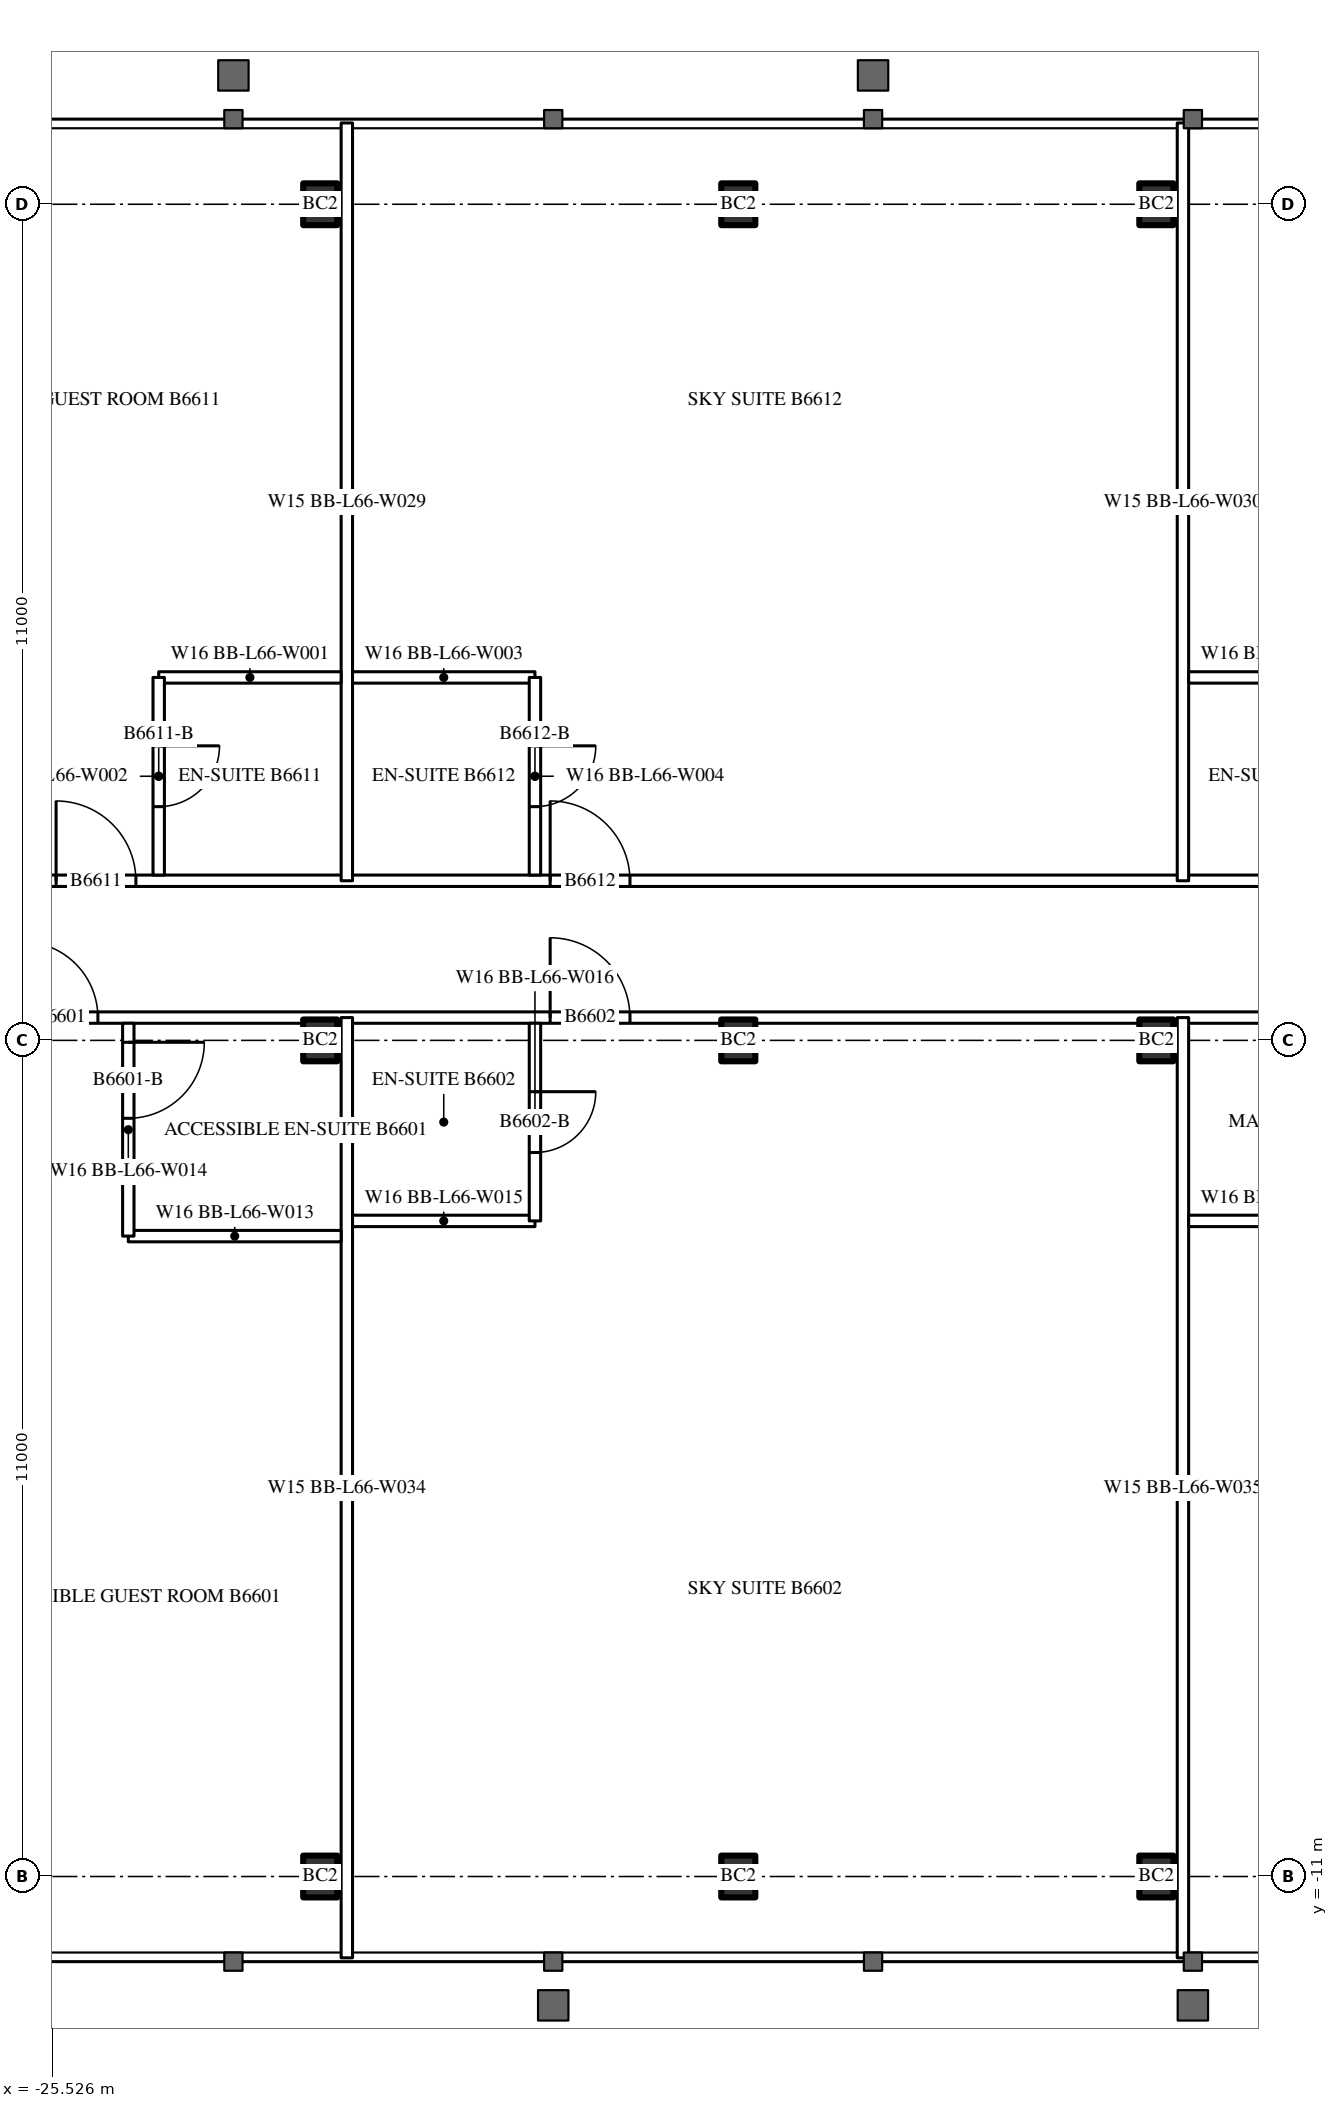
"""IFC4 building model, lengths in metres.
Left out: names, types, materials, properties, quantities, classifications, styles, units other than length and angle.
Written with IfcOpenShell. Run it as: python <this file> out.ifc"""

import sys

from ifc_helpers import new_model, si_unit, direction, frame, frame_2d, origin, origin_2d, place, context, subcontext, project, spatial, rectangle, i_section, extrude, element, fill, save


model = new_model("IFC4")
c1 = context("Model", 3, precision=1e-05, world=origin(), true_north=direction((0.0, 1.0)))
c2 = subcontext(c1, "Body", "Model", "MODEL_VIEW")
j1 = project(units=[si_unit("LENGTHUNIT", "METRE"), si_unit("PLANEANGLEUNIT", "RADIAN")], contexts=[c1])
p1 = place(None, origin())
s1 = spatial("IfcSite", under=j1, at=p1, CompositionType="ELEMENT")
p2 = place(p1, origin())
s2 = spatial("IfcBuilding", under=s1, at=p2, CompositionType="ELEMENT")
p3 = place(p2, frame((0.0, 0.0, 247.7)))
s3 = spatial("IfcBuildingStorey", under=s2, at=p3, CompositionType="ELEMENT", Elevation=247.7)
for number, where, z_axis, x_axis in (
    (1, (-22.0, -11.0, 0.0), (0.0, 0.0, 1.0), (1.0, 0.0, 0.0)),
    (2, (-16.5, -11.0, 0.0), (0.0, 0.0, 1.0), (1.0, 0.0, 0.0)),
    (3, (-11.0, -11.0, 0.0), (0.0, 0.0, 1.0), (1.0, 0.0, 0.0)),
    (4, (-22.0, 0.0, 0.0), (0.0, 0.0, 1.0), (1.0, 0.0, 0.0)),
    (5, (-16.5, 0.0, 0.0), (0.0, 0.0, 1.0), (1.0, 0.0, 0.0)),
    (6, (-11.0, 0.0, 0.0), (0.0, 0.0, 1.0), (1.0, 0.0, 0.0)),
    (7, (-22.0, 11.0, 0.0), (0.0, 0.0, 1.0), (1.0, 0.0, 0.0)),
    (8, (-16.5, 11.0, 0.0), (0.0, 0.0, 1.0), (1.0, 0.0, 0.0)),
    (9, (-11.0, 11.0, 0.0), (0.0, 0.0, 1.0), (1.0, 0.0, 0.0)),
):
    element("IfcColumn", number, at=place(p3, frame(where, z_axis=z_axis, x_axis=x_axis)), inside=s3, PredefinedType="COLUMN", context=c2, shape_type="SweptSolid", body=[
        extrude(i_section(OverallWidth=0.448, OverallDepth=0.55, WebThickness=0.072, FlangeThickness=0.115, FilletRadius=0.02, at=origin_2d()), origin(), (0.0, 0.0, 1.0), 4.2),
    ])
p4 = place(p3, frame((-27.5, 0.3, 0.0), z_axis=(0.0, 0.0, 1.0), x_axis=(1.0, 0.0, 0.0)))
e10 = element("IfcWall", 10, at=p4, inside=s3, PredefinedType="PARTITIONING", context=c2, shape_type="SweptSolid", body=[
    extrude(rectangle(XDim=55.0, YDim=0.15, at=frame_2d((27.5, 0.0))), origin(), (0.0, 0.0, 1.0), 3.0),
])
p5 = place(p4, frame((1.575, 0.0, 0.0)))
e11 = element("IfcOpeningElement", 11, at=p5, cuts=e10, PredefinedType="OPENING", context=c2, shape_type="SweptSolid", body=[
    extrude(rectangle(XDim=1.0, YDim=2.2, at=frame_2d((0.5, 1.1))), frame((0.0, 0.085, 0.0), z_axis=(0.0, -1.0, 0.0), x_axis=(1.0, 0.0, 0.0)), (0.0, 0.0, 1.0), 0.17),
])
p6 = place(p4, frame((8.525, 0.0, 0.0)))
e12 = element("IfcOpeningElement", 12, at=p6, cuts=e10, PredefinedType="OPENING", context=c2, shape_type="SweptSolid", body=[
    extrude(rectangle(XDim=1.05, YDim=2.4, at=frame_2d((0.525, 1.2))), frame((0.0, 0.085, 0.0), z_axis=(0.0, -1.0, 0.0), x_axis=(1.0, 0.0, 0.0)), (0.0, 0.0, 1.0), 0.17),
])
p7 = place(p4, frame((19.525, 0.0, 0.0)))
e13 = element("IfcOpeningElement", 13, at=p7, cuts=e10, PredefinedType="OPENING", context=c2, shape_type="SweptSolid", body=[
    extrude(rectangle(XDim=1.05, YDim=2.4, at=frame_2d((0.525, 1.2))), frame((0.0, 0.085, 0.0), z_axis=(0.0, -1.0, 0.0), x_axis=(1.0, 0.0, 0.0)), (0.0, 0.0, 1.0), 0.17),
])
p8 = place(p4, frame((25.025, 0.0, 0.0)))
e14 = element("IfcOpeningElement", 14, at=p8, cuts=e10, PredefinedType="OPENING", context=c2, shape_type="SweptSolid", body=[
    extrude(rectangle(XDim=1.05, YDim=2.4, at=frame_2d((0.525, 1.2))), frame((0.0, 0.085, 0.0), z_axis=(0.0, -1.0, 0.0), x_axis=(1.0, 0.0, 0.0)), (0.0, 0.0, 1.0), 0.17),
])
p9 = place(p4, frame((30.525, 0.0, 0.0)))
e15 = element("IfcOpeningElement", 15, at=p9, cuts=e10, PredefinedType="OPENING", context=c2, shape_type="SweptSolid", body=[
    extrude(rectangle(XDim=1.05, YDim=2.4, at=frame_2d((0.525, 1.2))), frame((0.0, 0.085, 0.0), z_axis=(0.0, -1.0, 0.0), x_axis=(1.0, 0.0, 0.0)), (0.0, 0.0, 1.0), 0.17),
])
p10 = place(p4, frame((41.525, 0.0, 0.0)))
e16 = element("IfcOpeningElement", 16, at=p10, cuts=e10, PredefinedType="OPENING", context=c2, shape_type="SweptSolid", body=[
    extrude(rectangle(XDim=1.05, YDim=2.4, at=frame_2d((0.525, 1.2))), frame((0.0, 0.085, 0.0), z_axis=(0.0, -1.0, 0.0), x_axis=(1.0, 0.0, 0.0)), (0.0, 0.0, 1.0), 0.17),
])
p11 = place(p4, frame((52.525, 0.0, 0.0)))
e17 = element("IfcOpeningElement", 17, at=p11, cuts=e10, PredefinedType="OPENING", context=c2, shape_type="SweptSolid", body=[
    extrude(rectangle(XDim=1.05, YDim=2.4, at=frame_2d((0.525, 1.2))), frame((0.0, 0.085, 0.0), z_axis=(0.0, -1.0, 0.0), x_axis=(1.0, 0.0, 0.0)), (0.0, 0.0, 1.0), 0.17),
])
p12 = place(p3, frame((-27.5, 2.1, 0.0), z_axis=(0.0, 0.0, 1.0), x_axis=(1.0, 0.0, 0.0)))
e18 = element("IfcWall", 18, at=p12, inside=s3, PredefinedType="PARTITIONING", context=c2, shape_type="SweptSolid", body=[
    extrude(rectangle(XDim=55.0, YDim=0.15, at=frame_2d((27.5, 0.0))), origin(), (0.0, 0.0, 1.0), 4.0),
])
p13 = place(p12, frame((2.025, 0.0, 0.0)))
e19 = element("IfcOpeningElement", 19, at=p13, cuts=e18, PredefinedType="OPENING", context=c2, shape_type="SweptSolid", body=[
    extrude(rectangle(XDim=1.05, YDim=2.4, at=frame_2d((0.525, 1.2))), frame((0.0, 0.085, 0.0), z_axis=(0.0, -1.0, 0.0), x_axis=(1.0, 0.0, 0.0)), (0.0, 0.0, 1.0), 0.17),
])
p14 = place(p12, frame((8.525, 0.0, 0.0)))
e20 = element("IfcOpeningElement", 20, at=p14, cuts=e18, PredefinedType="OPENING", context=c2, shape_type="SweptSolid", body=[
    extrude(rectangle(XDim=1.05, YDim=2.4, at=frame_2d((0.525, 1.2))), frame((0.0, 0.085, 0.0), z_axis=(0.0, -1.0, 0.0), x_axis=(1.0, 0.0, 0.0)), (0.0, 0.0, 1.0), 0.17),
])
p15 = place(p12, frame((19.525, 0.0, 0.0)))
e21 = element("IfcOpeningElement", 21, at=p15, cuts=e18, PredefinedType="OPENING", context=c2, shape_type="SweptSolid", body=[
    extrude(rectangle(XDim=1.05, YDim=2.4, at=frame_2d((0.525, 1.2))), frame((0.0, 0.085, 0.0), z_axis=(0.0, -1.0, 0.0), x_axis=(1.0, 0.0, 0.0)), (0.0, 0.0, 1.0), 0.17),
])
p16 = place(p12, frame((30.525, 0.0, 0.0)))
e22 = element("IfcOpeningElement", 22, at=p16, cuts=e18, PredefinedType="OPENING", context=c2, shape_type="SweptSolid", body=[
    extrude(rectangle(XDim=1.05, YDim=2.4, at=frame_2d((0.525, 1.2))), frame((0.0, 0.085, 0.0), z_axis=(0.0, -1.0, 0.0), x_axis=(1.0, 0.0, 0.0)), (0.0, 0.0, 1.0), 0.17),
])
p17 = place(p12, frame((41.525, 0.0, 0.0)))
e23 = element("IfcOpeningElement", 23, at=p17, cuts=e18, PredefinedType="OPENING", context=c2, shape_type="SweptSolid", body=[
    extrude(rectangle(XDim=1.05, YDim=2.4, at=frame_2d((0.525, 1.2))), frame((0.0, 0.085, 0.0), z_axis=(0.0, -1.0, 0.0), x_axis=(1.0, 0.0, 0.0)), (0.0, 0.0, 1.0), 0.17),
])
p18 = place(p12, frame((52.525, 0.0, 0.0)))
e24 = element("IfcOpeningElement", 24, at=p18, cuts=e18, PredefinedType="OPENING", context=c2, shape_type="SweptSolid", body=[
    extrude(rectangle(XDim=1.05, YDim=2.4, at=frame_2d((0.525, 1.2))), frame((0.0, 0.085, 0.0), z_axis=(0.0, -1.0, 0.0), x_axis=(1.0, 0.0, 0.0)), (0.0, 0.0, 1.0), 0.17),
])
for number, where, z_axis, x_axis in (
    (25, (-21.65, -12.07, 0.0), (0.0, 0.0, 1.0), (0.0, 1.0, 0.0)),
    (26, (-10.65, -12.07, 0.0), (0.0, 0.0, 1.0), (0.0, 1.0, 0.0)),
):
    element("IfcWall", number, at=place(p3, frame(where, z_axis=z_axis, x_axis=x_axis)), inside=s3, PredefinedType="PARTITIONING", context=c2, shape_type="SweptSolid", body=[
        extrude(rectangle(XDim=12.37, YDim=0.15, at=frame_2d((6.185, 0.0))), origin(), (0.0, 0.0, 1.0), 4.0),
    ])
p19 = place(p3, frame((-24.525, -2.575, 0.0), z_axis=(0.0, 0.0, 1.0), x_axis=(1.0, 0.0, 0.0)))
e27 = element("IfcWall", 27, at=p19, inside=s3, PredefinedType="PARTITIONING", context=c2, shape_type="SweptSolid", body=[
    extrude(rectangle(XDim=2.8, YDim=0.15, at=frame_2d((1.4, 0.0))), origin(), (0.0, 0.0, 1.0), 4.0),
])
p20 = place(p3, frame((-24.525, -2.575, 0.0), z_axis=(0.0, 0.0, 1.0), x_axis=(0.0, 1.0, 0.0)))
e28 = element("IfcWall", 28, at=p20, inside=s3, PredefinedType="PARTITIONING", context=c2, shape_type="SweptSolid", body=[
    extrude(rectangle(XDim=2.8, YDim=0.15, at=frame_2d((1.4, 0.0))), origin(), (0.0, 0.0, 1.0), 4.0),
])
p21 = place(p20, frame((1.55, 0.0, 0.0)))
e29 = element("IfcOpeningElement", 29, at=p21, cuts=e28, PredefinedType="OPENING", context=c2, shape_type="SweptSolid", body=[
    extrude(rectangle(XDim=1.0, YDim=2.2, at=frame_2d((0.5, 1.1))), frame((0.0, 0.085, 0.0), z_axis=(0.0, -1.0, 0.0), x_axis=(1.0, 0.0, 0.0)), (0.0, 0.0, 1.0), 0.17),
])
p22 = place(p3, frame((-21.575, -2.375, 0.0), z_axis=(0.0, 0.0, 1.0), x_axis=(1.0, 0.0, 0.0)))
e30 = element("IfcWall", 30, at=p22, inside=s3, PredefinedType="PARTITIONING", context=c2, shape_type="SweptSolid", body=[
    extrude(rectangle(XDim=2.4, YDim=0.15, at=frame_2d((1.2, 0.0))), origin(), (0.0, 0.0, 1.0), 4.0),
])
p23 = place(p3, frame((-19.175, -2.375, 0.0), z_axis=(0.0, 0.0, 1.0), x_axis=(0.0, 1.0, 0.0)))
e31 = element("IfcWall", 31, at=p23, inside=s3, PredefinedType="PARTITIONING", context=c2, shape_type="SweptSolid", body=[
    extrude(rectangle(XDim=2.6, YDim=0.15, at=frame_2d((1.3, 0.0))), origin(), (0.0, 0.0, 1.0), 4.0),
])
p24 = place(p23, frame((0.9, 0.0, 0.0)))
e32 = element("IfcOpeningElement", 32, at=p24, cuts=e31, PredefinedType="OPENING", context=c2, shape_type="SweptSolid", body=[
    extrude(rectangle(XDim=0.8, YDim=2.2, at=frame_2d((0.4, 1.1))), frame((0.0, 0.085, 0.0), z_axis=(0.0, -1.0, 0.0), x_axis=(1.0, 0.0, 0.0)), (0.0, 0.0, 1.0), 0.17),
])
p25 = place(p3, frame((-10.575, -2.375, 0.0), z_axis=(0.0, 0.0, 1.0), x_axis=(1.0, 0.0, 0.0)))
e33 = element("IfcWall", 33, at=p25, inside=s3, PredefinedType="PARTITIONING", context=c2, shape_type="SweptSolid", body=[
    extrude(rectangle(XDim=2.4, YDim=0.15, at=frame_2d((1.2, 0.0))), origin(), (0.0, 0.0, 1.0), 4.0),
])
for number, where, z_axis, x_axis in (
    (34, (-21.65, 2.1, 0.0), (0.0, 0.0, 1.0), (0.0, 1.0, 0.0)),
    (35, (-10.65, 2.1, 0.0), (0.0, 0.0, 1.0), (0.0, 1.0, 0.0)),
):
    element("IfcWall", number, at=place(p3, frame(where, z_axis=z_axis, x_axis=x_axis)), inside=s3, PredefinedType="PARTITIONING", context=c2, shape_type="SweptSolid", body=[
        extrude(rectangle(XDim=9.97, YDim=0.15, at=frame_2d((4.985, 0.0))), origin(), (0.0, 0.0, 1.0), 4.0),
    ])
p26 = place(p3, frame((-24.125, 4.775, 0.0), z_axis=(0.0, 0.0, 1.0), x_axis=(1.0, 0.0, 0.0)))
e36 = element("IfcWall", 36, at=p26, inside=s3, PredefinedType="PARTITIONING", context=c2, shape_type="SweptSolid", body=[
    extrude(rectangle(XDim=2.4, YDim=0.15, at=frame_2d((1.2, 0.0))), origin(), (0.0, 0.0, 1.0), 4.0),
])
p27 = place(p3, frame((-24.125, 2.175, 0.0), z_axis=(0.0, 0.0, 1.0), x_axis=(0.0, 1.0, 0.0)))
e37 = element("IfcWall", 37, at=p27, inside=s3, PredefinedType="PARTITIONING", context=c2, shape_type="SweptSolid", body=[
    extrude(rectangle(XDim=2.6, YDim=0.15, at=frame_2d((1.3, 0.0))), origin(), (0.0, 0.0, 1.0), 4.0),
])
p28 = place(p27, frame((0.9, 0.0, 0.0)))
e38 = element("IfcOpeningElement", 38, at=p28, cuts=e37, PredefinedType="OPENING", context=c2, shape_type="SweptSolid", body=[
    extrude(rectangle(XDim=0.8, YDim=2.2, at=frame_2d((0.4, 1.1))), frame((0.0, 0.085, 0.0), z_axis=(0.0, -1.0, 0.0), x_axis=(1.0, 0.0, 0.0)), (0.0, 0.0, 1.0), 0.17),
])
p29 = place(p3, frame((-21.575, 4.775, 0.0), z_axis=(0.0, 0.0, 1.0), x_axis=(1.0, 0.0, 0.0)))
e39 = element("IfcWall", 39, at=p29, inside=s3, PredefinedType="PARTITIONING", context=c2, shape_type="SweptSolid", body=[
    extrude(rectangle(XDim=2.4, YDim=0.15, at=frame_2d((1.2, 0.0))), origin(), (0.0, 0.0, 1.0), 4.0),
])
p30 = place(p3, frame((-19.175, 2.175, 0.0), z_axis=(0.0, 0.0, 1.0), x_axis=(0.0, 1.0, 0.0)))
e40 = element("IfcWall", 40, at=p30, inside=s3, PredefinedType="PARTITIONING", context=c2, shape_type="SweptSolid", body=[
    extrude(rectangle(XDim=2.6, YDim=0.15, at=frame_2d((1.3, 0.0))), origin(), (0.0, 0.0, 1.0), 4.0),
])
p31 = place(p30, frame((0.9, 0.0, 0.0)))
e41 = element("IfcOpeningElement", 41, at=p31, cuts=e40, PredefinedType="OPENING", context=c2, shape_type="SweptSolid", body=[
    extrude(rectangle(XDim=0.8, YDim=2.2, at=frame_2d((0.4, 1.1))), frame((0.0, 0.085, 0.0), z_axis=(0.0, -1.0, 0.0), x_axis=(1.0, 0.0, 0.0)), (0.0, 0.0, 1.0), 0.17),
])
p32 = place(p3, frame((-10.575, 4.775, 0.0), z_axis=(0.0, 0.0, 1.0), x_axis=(1.0, 0.0, 0.0)))
e42 = element("IfcWall", 42, at=p32, inside=s3, PredefinedType="PARTITIONING", context=c2, shape_type="SweptSolid", body=[
    extrude(rectangle(XDim=2.4, YDim=0.15, at=frame_2d((1.2, 0.0))), origin(), (0.0, 0.0, 1.0), 4.0),
])
p33 = place(p21, origin())
e43 = element("IfcDoor", 43, at=p33, inside=s3, OperationType="SINGLE_SWING_RIGHT", PredefinedType="DOOR", context=c2, shape_type="SweptSolid", body=[
    extrude(rectangle(XDim=1.0, YDim=2.2, at=frame_2d((0.5, 1.1))), frame((0.0, 0.025, 0.0), z_axis=(0.0, -1.0, 0.0), x_axis=(1.0, 0.0, 0.0)), (0.0, 0.0, 1.0), 0.05),
])
fill(e29, e43)
p34 = place(p5, origin())
e44 = element("IfcDoor", 44, at=p34, inside=s3, OperationType="SINGLE_SWING_LEFT", PredefinedType="DOOR", context=c2, shape_type="SweptSolid", body=[
    extrude(rectangle(XDim=1.0, YDim=2.2, at=frame_2d((0.5, 1.1))), frame((0.0, 0.025, 0.0), z_axis=(0.0, -1.0, 0.0), x_axis=(1.0, 0.0, 0.0)), (0.0, 0.0, 1.0), 0.05),
])
fill(e11, e44)
p35 = place(p24, origin())
e45 = element("IfcDoor", 45, at=p35, inside=s3, OperationType="SINGLE_SWING_RIGHT", PredefinedType="DOOR", context=c2, shape_type="SweptSolid", body=[
    extrude(rectangle(XDim=0.8, YDim=2.2, at=frame_2d((0.4, 1.1))), frame((0.0, 0.025, 0.0), z_axis=(0.0, -1.0, 0.0), x_axis=(1.0, 0.0, 0.0)), (0.0, 0.0, 1.0), 0.05),
])
fill(e32, e45)
p36 = place(p6, origin())
e46 = element("IfcDoor", 46, at=p36, inside=s3, OperationType="SINGLE_SWING_LEFT", PredefinedType="DOOR", context=c2, shape_type="SweptSolid", body=[
    extrude(rectangle(XDim=1.05, YDim=2.4, at=frame_2d((0.525, 1.2))), frame((0.0, 0.025, 0.0), z_axis=(0.0, -1.0, 0.0), x_axis=(1.0, 0.0, 0.0)), (0.0, 0.0, 1.0), 0.05),
])
fill(e12, e46)
p37 = place(p28, origin())
e47 = element("IfcDoor", 47, at=p37, inside=s3, OperationType="SINGLE_SWING_RIGHT", PredefinedType="DOOR", context=c2, shape_type="SweptSolid", body=[
    extrude(rectangle(XDim=0.8, YDim=2.2, at=frame_2d((0.4, 1.1))), frame((0.0, 0.025, 0.0), z_axis=(0.0, -1.0, 0.0), x_axis=(1.0, 0.0, 0.0)), (0.0, 0.0, 1.0), 0.05),
])
fill(e38, e47)
p38 = place(p13, origin())
e48 = element("IfcDoor", 48, at=p38, inside=s3, OperationType="SINGLE_SWING_LEFT", PredefinedType="DOOR", context=c2, shape_type="SweptSolid", body=[
    extrude(rectangle(XDim=1.05, YDim=2.4, at=frame_2d((0.525, 1.2))), frame((0.0, 0.025, 0.0), z_axis=(0.0, -1.0, 0.0), x_axis=(1.0, 0.0, 0.0)), (0.0, 0.0, 1.0), 0.05),
])
fill(e19, e48)
p39 = place(p31, origin())
e49 = element("IfcDoor", 49, at=p39, inside=s3, OperationType="SINGLE_SWING_RIGHT", PredefinedType="DOOR", context=c2, shape_type="SweptSolid", body=[
    extrude(rectangle(XDim=0.8, YDim=2.2, at=frame_2d((0.4, 1.1))), frame((0.0, 0.025, 0.0), z_axis=(0.0, -1.0, 0.0), x_axis=(1.0, 0.0, 0.0)), (0.0, 0.0, 1.0), 0.05),
])
fill(e41, e49)
p40 = place(p14, origin())
e50 = element("IfcDoor", 50, at=p40, inside=s3, OperationType="SINGLE_SWING_LEFT", PredefinedType="DOOR", context=c2, shape_type="SweptSolid", body=[
    extrude(rectangle(XDim=1.05, YDim=2.4, at=frame_2d((0.525, 1.2))), frame((0.0, 0.025, 0.0), z_axis=(0.0, -1.0, 0.0), x_axis=(1.0, 0.0, 0.0)), (0.0, 0.0, 1.0), 0.05),
])
fill(e20, e50)
save(model, sys.argv[1])
